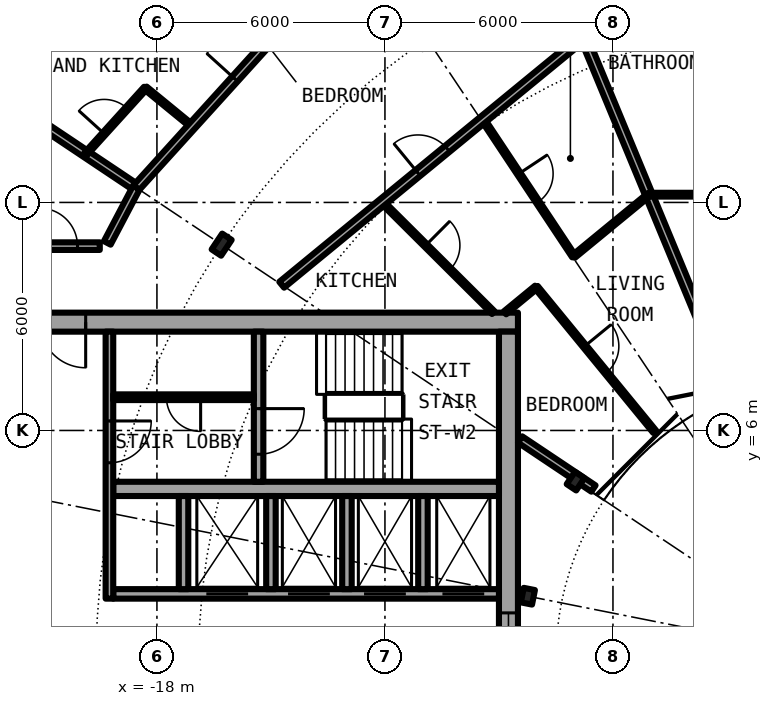
"""IFC4 building model, lengths in metres.
Left out: names, types, materials, properties, quantities, classifications, styles, units other than length and angle.
Written with IfcOpenShell. Run it as: python <this file> out.ifc"""

import sys

from ifc_helpers import new_model, si_unit, direction, frame, frame_2d, origin, origin_2d, place, context, subcontext, project, spatial, rectangle, i_section, extrude, element, fill, save


model = new_model("IFC4")
c1 = context("Model", 3, precision=1e-05, world=origin(), true_north=direction((0.0, 1.0)))
c2 = subcontext(c1, "Body", "Model", "MODEL_VIEW")
j1 = project(units=[si_unit("LENGTHUNIT", "METRE"), si_unit("PLANEANGLEUNIT", "RADIAN")], contexts=[c1])
p1 = place(None, origin())
s1 = spatial("IfcSite", under=j1, at=p1, CompositionType="ELEMENT")
p2 = place(p1, origin())
s2 = spatial("IfcBuilding", under=s1, at=p2, CompositionType="ELEMENT")
p3 = place(p2, frame((0.0, 0.0, 173.8)))
s3 = spatial("IfcBuildingStorey", under=s2, at=p3, CompositionType="ELEMENT", Elevation=173.8)
p4 = place(p3, frame((-16.297, 10.889, 0.0), z_axis=(0.0, 0.0, 1.0), x_axis=(-0.831469612303, 0.55557023302, 0.0)))
e1 = element("IfcColumn", 1, at=p4, inside=s3, PredefinedType="COLUMN", context=c2, shape_type="SweptSolid", body=[
    extrude(i_section(OverallWidth=0.3, OverallDepth=0.5, WebThickness=0.014, FlangeThickness=0.028, FilletRadius=0.027, at=origin_2d()), origin(), (0.0, 0.0, 1.0), 3.05),
])
for number, where, z_axis, x_axis in (
    (2, (-6.984, 4.667, 0.0), (0.0, 0.0, 1.0), (-0.831, 0.556, 0.0)),
    (3, (-8.239, 1.639, 0.0), (0.0, 0.0, 1.0), (-0.981, 0.195, 0.0)),
):
    element("IfcColumn", number, at=place(p3, frame(where, z_axis=z_axis, x_axis=x_axis)), inside=s3, PredefinedType="COLUMN", context=c2, shape_type="SweptSolid", body=[
        extrude(i_section(OverallWidth=0.3, OverallDepth=0.39, WebThickness=0.011, FlangeThickness=0.019, FilletRadius=0.027, at=origin_2d()), origin(), (0.0, 0.0, 1.0), 3.05),
    ])
p5 = place(p3, frame((-19.304, 19.304, 0.0), z_axis=(0.0, 0.0, 1.0), x_axis=(-0.634382322723, -0.773019449054, 0.0)))
e4 = element("IfcWall", 4, at=p5, inside=s3, PredefinedType="SOLIDWALL", context=c2, shape_type="SweptSolid", body=[
    extrude(rectangle(XDim=5.352, YDim=0.25, at=frame_2d((2.676, 0.0))), origin(), (0.0, 0.0, 1.0), 2.7),
])
p6 = place(p5, frame((0.841, 0.0, 0.0)))
e5 = element("IfcOpeningElement", 5, at=p6, cuts=e4, PredefinedType="OPENING", context=c2, shape_type="SweptSolid", body=[
    extrude(rectangle(XDim=1.0, YDim=2.2, at=frame_2d((0.5, 1.1))), frame((0.0, 0.135, 0.0), z_axis=(0.0, -1.0, 0.0), x_axis=(1.0, 0.0, 0.0)), (0.0, 0.0, 1.0), 0.27),
])
p7 = place(p5, frame((3.111, 0.0, 0.3)))
e6 = element("IfcOpeningElement", 6, at=p7, cuts=e4, PredefinedType="OPENING", context=c2, shape_type="SweptSolid", body=[
    extrude(rectangle(XDim=1.8, YDim=2.1, at=frame_2d((0.9, 1.05))), frame((0.0, 0.135, 0.0), z_axis=(0.0, -1.0, 0.0), x_axis=(1.0, 0.0, 0.0)), (0.0, 0.0, 1.0), 0.27),
])
p8 = place(p3, frame((-8.5, 8.85, 0.0), z_axis=(0.0, 0.0, 1.0), x_axis=(-1.0, 0.0, 0.0)))
e7 = element("IfcWall", 7, at=p8, inside=s3, PredefinedType="SHEAR", context=c2, shape_type="SweptSolid", body=[
    extrude(rectangle(XDim=13.6, YDim=0.5, at=frame_2d((6.8, 0.0))), origin(), (0.0, 0.0, 1.0), 3.05),
])
p9 = place(p8, frame((11.375, 0.0, 0.0)))
e8 = element("IfcOpeningElement", 8, at=p9, cuts=e7, PredefinedType="OPENING", context=c2, shape_type="SweptSolid", body=[
    extrude(rectangle(XDim=1.2, YDim=2.3, at=frame_2d((0.6, 1.15))), frame((0.0, 0.26, 0.0), z_axis=(0.0, -1.0, 0.0), x_axis=(1.0, 0.0, 0.0)), (0.0, 0.0, 1.0), 0.52),
])
p10 = place(p3, frame((-8.75, 8.6, 0.0), z_axis=(0.0, 0.0, 1.0), x_axis=(0.0, -1.0, 0.0)))
e9 = element("IfcWall", 9, at=p10, inside=s3, PredefinedType="SHEAR", context=c2, shape_type="SweptSolid", body=[
    extrude(rectangle(XDim=17.2, YDim=0.5, at=frame_2d((8.6, 0.0))), origin(), (0.0, 0.0, 1.0), 3.05),
])
p11 = place(p10, frame((7.4, 0.0, 0.1)))
e10 = element("IfcOpeningElement", 10, at=p11, cuts=e9, PredefinedType="OPENING", context=c2, shape_type="SweptSolid", body=[
    extrude(rectangle(XDim=2.4, YDim=2.2, at=frame_2d((1.2, 1.1))), frame((0.0, 0.26, 0.0), z_axis=(0.0, -1.0, 0.0), x_axis=(1.0, 0.0, 0.0)), (0.0, 0.0, 1.0), 0.52),
])
p12 = place(p3, frame((-9.0, 1.7, 0.0), z_axis=(0.0, 0.0, 1.0), x_axis=(-1.0, 0.0, 0.0)))
e11 = element("IfcWall", 11, at=p12, inside=s3, PredefinedType="SHEAR", context=c2, shape_type="SweptSolid", body=[
    extrude(rectangle(XDim=10.15, YDim=0.25, at=frame_2d((5.075, 0.0))), origin(), (0.0, 0.0, 1.0), 3.05),
])
p13 = place(p12, frame((0.387, 0.0, 0.0)))
e12 = element("IfcOpeningElement", 12, at=p13, cuts=e11, PredefinedType="OPENING", context=c2, shape_type="SweptSolid", body=[
    extrude(rectangle(XDim=1.1, YDim=2.3, at=frame_2d((0.55, 1.15))), frame((0.0, 0.135, 0.0), z_axis=(0.0, -1.0, 0.0), x_axis=(1.0, 0.0, 0.0)), (0.0, 0.0, 1.0), 0.27),
])
p14 = place(p12, frame((2.45, 0.0, 0.0)))
e13 = element("IfcOpeningElement", 13, at=p14, cuts=e11, PredefinedType="OPENING", context=c2, shape_type="SweptSolid", body=[
    extrude(rectangle(XDim=1.1, YDim=2.3, at=frame_2d((0.55, 1.15))), frame((0.0, 0.135, 0.0), z_axis=(0.0, -1.0, 0.0), x_axis=(1.0, 0.0, 0.0)), (0.0, 0.0, 1.0), 0.27),
])
p15 = place(p12, frame((4.45, 0.0, 0.0)))
e14 = element("IfcOpeningElement", 14, at=p15, cuts=e11, PredefinedType="OPENING", context=c2, shape_type="SweptSolid", body=[
    extrude(rectangle(XDim=1.1, YDim=2.3, at=frame_2d((0.55, 1.15))), frame((0.0, 0.135, 0.0), z_axis=(0.0, -1.0, 0.0), x_axis=(1.0, 0.0, 0.0)), (0.0, 0.0, 1.0), 0.27),
])
p16 = place(p12, frame((6.6, 0.0, 0.0)))
e15 = element("IfcOpeningElement", 15, at=p16, cuts=e11, PredefinedType="OPENING", context=c2, shape_type="SweptSolid", body=[
    extrude(rectangle(XDim=1.1, YDim=2.3, at=frame_2d((0.55, 1.15))), frame((0.0, 0.135, 0.0), z_axis=(0.0, -1.0, 0.0), x_axis=(1.0, 0.0, 0.0)), (0.0, 0.0, 1.0), 0.27),
])
p17 = place(p3, frame((-9.0, 4.462, 0.0), z_axis=(0.0, 0.0, 1.0), x_axis=(-1.0, 0.0, 0.0)))
e16 = element("IfcWall", 16, at=p17, inside=s3, PredefinedType="SHEAR", context=c2, shape_type="SweptSolid", body=[
    extrude(rectangle(XDim=10.15, YDim=0.375, at=frame_2d((5.075, 0.0))), origin(), (0.0, 0.0, 1.0), 3.05),
])
p18 = place(p3, frame((-15.325, 8.6, 0.0), z_axis=(0.0, 0.0, 1.0), x_axis=(0.0, -1.0, 0.0)))
e17 = element("IfcWall", 17, at=p18, inside=s3, PredefinedType="SHEAR", context=c2, shape_type="SweptSolid", body=[
    extrude(rectangle(XDim=3.95, YDim=0.25, at=frame_2d((1.975, 0.0))), origin(), (0.0, 0.0, 1.0), 3.05),
])
p19 = place(p18, frame((2.025, 0.0, 0.0)))
e18 = element("IfcOpeningElement", 18, at=p19, cuts=e17, PredefinedType="OPENING", context=c2, shape_type="SweptSolid", body=[
    extrude(rectangle(XDim=1.2, YDim=2.3, at=frame_2d((0.6, 1.15))), frame((0.0, 0.135, 0.0), z_axis=(0.0, -1.0, 0.0), x_axis=(1.0, 0.0, 0.0)), (0.0, 0.0, 1.0), 0.27),
])
for number, where, z_axis, x_axis in (
    (19, (-15.0, 1.825, 0.0), (0.0, 0.0, 1.0), (0.0, 1.0, 0.0)),
    (20, (-17.3, 1.825, 0.0), (0.0, 0.0, 1.0), (0.0, 1.0, 0.0)),
):
    element("IfcWall", number, at=place(p3, frame(where, z_axis=z_axis, x_axis=x_axis)), inside=s3, PredefinedType="SOLIDWALL", context=c2, shape_type="SweptSolid", body=[
        extrude(rectangle(XDim=2.45, YDim=0.25, at=frame_2d((1.225, 0.0))), origin(), (0.0, 0.0, 1.0), 2.7),
    ])
p20 = place(p3, frame((-19.25, 8.6, 0.0), z_axis=(0.0, 0.0, 1.0), x_axis=(0.0, -1.0, 0.0)))
e21 = element("IfcWall", 21, at=p20, inside=s3, PredefinedType="SOLIDWALL", context=c2, shape_type="SweptSolid", body=[
    extrude(rectangle(XDim=7.025, YDim=0.2, at=frame_2d((3.513, 0.0))), origin(), (0.0, 0.0, 1.0), 2.7),
])
p21 = place(p20, frame((2.35, 0.0, 0.0)))
e22 = element("IfcOpeningElement", 22, at=p21, cuts=e21, PredefinedType="OPENING", context=c2, shape_type="SweptSolid", body=[
    extrude(rectangle(XDim=1.1, YDim=2.3, at=frame_2d((0.55, 1.15))), frame((0.0, 0.11, 0.0), z_axis=(0.0, -1.0, 0.0), x_axis=(1.0, 0.0, 0.0)), (0.0, 0.0, 1.0), 0.22),
])
for number, where, z_axis, x_axis in (
    (23, (-11.0, 1.825, 0.0), (0.0, 0.0, 1.0), (0.0, 1.0, 0.0)),
    (24, (-13.0, 1.825, 0.0), (0.0, 0.0, 1.0), (0.0, 1.0, 0.0)),
):
    element("IfcWall", number, at=place(p3, frame(where, z_axis=z_axis, x_axis=x_axis)), inside=s3, PredefinedType="SOLIDWALL", context=c2, shape_type="SweptSolid", body=[
        extrude(rectangle(XDim=2.45, YDim=0.25, at=frame_2d((1.225, 0.0))), origin(), (0.0, 0.0, 1.0), 2.7),
    ])
p22 = place(p3, frame((-15.45, 6.875, 0.0), z_axis=(0.0, 0.0, 1.0), x_axis=(-1.0, 0.0, 0.0)))
e25 = element("IfcWall", 25, at=p22, inside=s3, PredefinedType="PARTITIONING", context=c2, shape_type="SweptSolid", body=[
    extrude(rectangle(XDim=3.7, YDim=0.15, at=frame_2d((1.85, 0.0))), origin(), (0.0, 0.0, 1.0), 2.7),
])
p23 = place(p22, frame((1.4, 0.0, 0.0)))
e26 = element("IfcOpeningElement", 26, at=p23, cuts=e25, PredefinedType="OPENING", context=c2, shape_type="SweptSolid", body=[
    extrude(rectangle(XDim=0.9, YDim=2.3, at=frame_2d((0.45, 1.15))), frame((0.0, 0.085, 0.0), z_axis=(0.0, -1.0, 0.0), x_axis=(1.0, 0.0, 0.0)), (0.0, 0.0, 1.0), 0.17),
])
p24 = place(p3, frame((-8.019, 9.771, 0.0), z_axis=(0.0, 0.0, 1.0), x_axis=(0.633851064378, -0.773455123577, 0.0)))
e27 = element("IfcWall", 27, at=p24, inside=s3, PredefinedType="PARTITIONING", context=c2, shape_type="SweptSolid", body=[
    extrude(rectangle(XDim=4.919, YDim=0.1, at=frame_2d((2.46, 0.0))), origin(), (0.0, 0.0, 1.0), 2.7),
])
p25 = place(p24, frame((2.01, 0.0, 0.0)))
e28 = element("IfcOpeningElement", 28, at=p25, cuts=e27, PredefinedType="OPENING", context=c2, shape_type="SweptSolid", body=[
    extrude(rectangle(XDim=0.9, YDim=2.3, at=frame_2d((0.45, 1.15))), frame((0.0, 0.06, 0.0), z_axis=(0.0, -1.0, 0.0), x_axis=(1.0, 0.0, 0.0)), (0.0, 0.0, 1.0), 0.12),
])
p26 = place(p3, frame((-22.595, 15.098, 0.0), z_axis=(0.0, 0.0, 1.0), x_axis=(0.831387096605, -0.55569370664, 0.0)))
e29 = element("IfcWall", 29, at=p26, inside=s3, PredefinedType="PARTITIONING", context=c2, shape_type="SweptSolid", body=[
    extrude(rectangle(XDim=4.875, YDim=0.2, at=frame_2d((2.438, 0.0))), origin(), (0.0, 0.0, 1.0), 2.7),
])
p27 = place(p3, frame((-12.069, 12.007, 0.0), z_axis=(0.0, 0.0, 1.0), x_axis=(0.708822693149, -0.705386695138, 0.0)))
e30 = element("IfcWall", 30, at=p27, inside=s3, PredefinedType="PARTITIONING", context=c2, shape_type="SweptSolid", body=[
    extrude(rectangle(XDim=4.121, YDim=0.1, at=frame_2d((2.061, 0.0))), origin(), (0.0, 0.0, 1.0), 2.7),
])
p28 = place(p27, frame((1.611, 0.0, 0.0)))
e31 = element("IfcOpeningElement", 31, at=p28, cuts=e30, PredefinedType="OPENING", context=c2, shape_type="SweptSolid", body=[
    extrude(rectangle(XDim=0.9, YDim=2.3, at=frame_2d((0.45, 1.15))), frame((0.0, 0.06, 0.0), z_axis=(0.0, -1.0, 0.0), x_axis=(1.0, 0.0, 0.0)), (0.0, 0.0, 1.0), 0.12),
])
p29 = place(p3, frame((-9.421, 14.18, 0.0), z_axis=(0.0, 0.0, 1.0), x_axis=(0.553303732327, -0.832979579457, 0.0)))
e32 = element("IfcWall", 32, at=p29, inside=s3, PredefinedType="PARTITIONING", context=c2, shape_type="SweptSolid", body=[
    extrude(rectangle(XDim=4.319, YDim=0.1, at=frame_2d((2.16, 0.0))), origin(), (0.0, 0.0, 1.0), 2.7),
])
p30 = place(p29, frame((1.71, 0.0, 0.0)))
e33 = element("IfcOpeningElement", 33, at=p30, cuts=e32, PredefinedType="OPENING", context=c2, shape_type="SweptSolid", body=[
    extrude(rectangle(XDim=0.9, YDim=2.3, at=frame_2d((0.45, 1.15))), frame((0.0, 0.06, 0.0), z_axis=(0.0, -1.0, 0.0), x_axis=(1.0, 0.0, 0.0)), (0.0, 0.0, 1.0), 0.12),
])
p31 = place(p3, frame((-6.773, 16.353, 0.0), z_axis=(0.0, 0.0, 1.0), x_axis=(0.382632652025, -0.923900564782, 0.0)))
e34 = element("IfcWall", 34, at=p31, inside=s3, PredefinedType="PARTITIONING", context=c2, shape_type="SweptSolid", body=[
    extrude(rectangle(XDim=9.98, YDim=0.2, at=frame_2d((4.99, 0.0))), origin(), (0.0, 0.0, 1.0), 2.7),
])
p32 = place(p3, frame((-18.302, 15.01, 0.0), z_axis=(0.0, 0.0, 1.0), x_axis=(0.773476341377, -0.633825172528, 0.0)))
e35 = element("IfcWall", 35, at=p32, inside=s3, PredefinedType="PARTITIONING", context=c2, shape_type="SweptSolid", body=[
    extrude(rectangle(XDim=1.584, YDim=0.1, at=frame_2d((0.792, 0.0))), origin(), (0.0, 0.0, 1.0), 2.7),
])
p33 = place(p3, frame((-6.513, 4.472, 0.0), z_axis=(0.0, 0.0, 1.0), x_axis=(-0.83133816625, 0.555766905579, 0.0)))
e36 = element("IfcWall", 36, at=p33, inside=s3, PredefinedType="PARTITIONING", context=c2, shape_type="SweptSolid", body=[
    extrude(rectangle(XDim=2.323, YDim=0.2, at=frame_2d((1.162, 0.0))), origin(), (0.0, 0.0, 1.0), 2.7),
])
p34 = place(p3, frame((-21.675, 10.85, 0.0), z_axis=(0.0, 0.0, 1.0), x_axis=(1.0, 0.0, 0.0)))
e37 = element("IfcWall", 37, at=p34, inside=s3, PredefinedType="PARTITIONING", context=c2, shape_type="SweptSolid", body=[
    extrude(rectangle(XDim=2.171, YDim=0.2, at=frame_2d((1.085, 0.0))), origin(), (0.0, 0.0, 1.0), 2.7),
])
p35 = place(p34, frame((0.585, 0.0, 0.0)))
e38 = element("IfcOpeningElement", 38, at=p35, cuts=e37, PredefinedType="OPENING", context=c2, shape_type="SweptSolid", body=[
    extrude(rectangle(XDim=1.0, YDim=2.3, at=frame_2d((0.5, 1.15))), frame((0.0, 0.11, 0.0), z_axis=(0.0, -1.0, 0.0), x_axis=(1.0, 0.0, 0.0)), (0.0, 0.0, 1.0), 0.22),
])
p36 = place(p3, frame((-5.055, 12.204, 0.0), z_axis=(0.0, 0.0, 1.0), x_axis=(1.0, 0.0, 0.0)))
e39 = element("IfcWall", 39, at=p36, inside=s3, PredefinedType="PARTITIONING", context=c2, shape_type="SweptSolid", body=[
    extrude(rectangle(XDim=2.528, YDim=0.1, at=frame_2d((1.264, 0.0))), origin(), (0.0, 0.0, 1.0), 2.7),
])
p37 = place(p3, frame((-8.842, 9.095, 0.0), z_axis=(0.0, 0.0, 1.0), x_axis=(0.772730269942, 0.634734534995, 0.0)))
e40 = element("IfcWall", 40, at=p37, inside=s3, PredefinedType="PARTITIONING", context=c2, shape_type="SweptSolid", body=[
    extrude(rectangle(XDim=1.065, YDim=0.1, at=frame_2d((0.532, 0.0))), origin(), (0.0, 0.0, 1.0), 2.7),
])
p38 = place(p3, frame((-7.034, 10.58, 0.0), z_axis=(0.0, 0.0, 1.0), x_axis=(0.772764723682, 0.634692588449, 0.0)))
e41 = element("IfcWall", 41, at=p38, inside=s3, PredefinedType="PARTITIONING", context=c2, shape_type="SweptSolid", body=[
    extrude(rectangle(XDim=2.557, YDim=0.1, at=frame_2d((1.278, 0.0))), origin(), (0.0, 0.0, 1.0), 2.7),
])
p39 = place(p3, frame((-14.717, 9.834, 0.0), z_axis=(0.0, 0.0, 1.0), x_axis=(0.773034536097, 0.634363938131, 0.0)))
e42 = element("IfcWall", 42, at=p39, inside=s3, PredefinedType="PARTITIONING", context=c2, shape_type="SweptSolid", body=[
    extrude(rectangle(XDim=10.277, YDim=0.2, at=frame_2d((5.138, 0.0))), origin(), (0.0, 0.0, 1.0), 2.7),
])
p40 = place(p39, frame((4.638, 0.0, 0.0)))
e43 = element("IfcOpeningElement", 43, at=p40, cuts=e42, PredefinedType="OPENING", context=c2, shape_type="SweptSolid", body=[
    extrude(rectangle(XDim=1.0, YDim=2.3, at=frame_2d((0.5, 1.15))), frame((0.0, 0.11, 0.0), z_axis=(0.0, -1.0, 0.0), x_axis=(1.0, 0.0, 0.0)), (0.0, 0.0, 1.0), 0.22),
])
p41 = place(p3, frame((-18.542, 12.389, 0.0), z_axis=(0.0, 0.0, 1.0), x_axis=(0.671561669125, 0.740948665268, 0.0)))
e44 = element("IfcWall", 44, at=p41, inside=s3, PredefinedType="PARTITIONING", context=c2, shape_type="SweptSolid", body=[
    extrude(rectangle(XDim=6.544, YDim=0.2, at=frame_2d((3.272, 0.0))), origin(), (0.0, 0.0, 1.0), 2.7),
])
p42 = place(p41, frame((3.862, 0.0, 0.0)))
e45 = element("IfcOpeningElement", 45, at=p42, cuts=e44, PredefinedType="OPENING", context=c2, shape_type="SweptSolid", body=[
    extrude(rectangle(XDim=1.0, YDim=2.3, at=frame_2d((0.5, 1.15))), frame((0.0, 0.11, 0.0), z_axis=(0.0, -1.0, 0.0), x_axis=(1.0, 0.0, 0.0)), (0.0, 0.0, 1.0), 0.22),
])
p43 = place(p3, frame((-19.307, 10.935, 0.0), z_axis=(0.0, 0.0, 1.0), x_axis=(0.465605550524, 0.884992356646, 0.0)))
e46 = element("IfcWall", 46, at=p43, inside=s3, PredefinedType="PARTITIONING", context=c2, shape_type="SweptSolid", body=[
    extrude(rectangle(XDim=1.643, YDim=0.2, at=frame_2d((0.821, 0.0))), origin(), (0.0, 0.0, 1.0), 2.7),
])
p44 = place(p3, frame((-19.872, 13.278, 0.0), z_axis=(0.0, 0.0, 1.0), x_axis=(0.671637685376, 0.740879760544, 0.0)))
e47 = element("IfcWall", 47, at=p44, inside=s3, PredefinedType="PARTITIONING", context=c2, shape_type="SweptSolid", body=[
    extrude(rectangle(XDim=2.338, YDim=0.1, at=frame_2d((1.169, 0.0))), origin(), (0.0, 0.0, 1.0), 2.7),
])
p45 = place(p44, frame((0.719, 0.0, 0.0)))
e48 = element("IfcOpeningElement", 48, at=p45, cuts=e47, PredefinedType="OPENING", context=c2, shape_type="SweptSolid", body=[
    extrude(rectangle(XDim=0.9, YDim=2.3, at=frame_2d((0.45, 1.15))), frame((0.0, 0.06, 0.0), z_axis=(0.0, -1.0, 0.0), x_axis=(1.0, 0.0, 0.0)), (0.0, 0.0, 1.0), 0.12),
])
p46 = place(p13, origin())
e49 = element("IfcDoor", 49, at=p46, inside=s3, OperationType="DOUBLE_DOOR_SLIDING", PredefinedType="DOOR", context=c2, shape_type="SweptSolid", body=[
    extrude(rectangle(XDim=1.1, YDim=2.3, at=frame_2d((0.55, 1.15))), frame((0.0, 0.025, 0.0), z_axis=(0.0, -1.0, 0.0), x_axis=(1.0, 0.0, 0.0)), (0.0, 0.0, 1.0), 0.05),
])
fill(e12, e49)
p47 = place(p14, origin())
e50 = element("IfcDoor", 50, at=p47, inside=s3, OperationType="DOUBLE_DOOR_SLIDING", PredefinedType="DOOR", context=c2, shape_type="SweptSolid", body=[
    extrude(rectangle(XDim=1.1, YDim=2.3, at=frame_2d((0.55, 1.15))), frame((0.0, 0.025, 0.0), z_axis=(0.0, -1.0, 0.0), x_axis=(1.0, 0.0, 0.0)), (0.0, 0.0, 1.0), 0.05),
])
fill(e13, e50)
p48 = place(p15, origin())
e51 = element("IfcDoor", 51, at=p48, inside=s3, OperationType="DOUBLE_DOOR_SLIDING", PredefinedType="DOOR", context=c2, shape_type="SweptSolid", body=[
    extrude(rectangle(XDim=1.1, YDim=2.3, at=frame_2d((0.55, 1.15))), frame((0.0, 0.025, 0.0), z_axis=(0.0, -1.0, 0.0), x_axis=(1.0, 0.0, 0.0)), (0.0, 0.0, 1.0), 0.05),
])
fill(e14, e51)
p49 = place(p16, origin())
e52 = element("IfcDoor", 52, at=p49, inside=s3, OperationType="DOUBLE_DOOR_SLIDING", PredefinedType="DOOR", context=c2, shape_type="SweptSolid", body=[
    extrude(rectangle(XDim=1.1, YDim=2.3, at=frame_2d((0.55, 1.15))), frame((0.0, 0.025, 0.0), z_axis=(0.0, -1.0, 0.0), x_axis=(1.0, 0.0, 0.0)), (0.0, 0.0, 1.0), 0.05),
])
fill(e15, e52)
p50 = place(p23, origin())
e53 = element("IfcDoor", 53, at=p50, inside=s3, OperationType="SINGLE_SWING_LEFT", PredefinedType="DOOR", context=c2, shape_type="SweptSolid", body=[
    extrude(rectangle(XDim=0.9, YDim=2.3, at=frame_2d((0.45, 1.15))), frame((0.0, 0.025, 0.0), z_axis=(0.0, -1.0, 0.0), x_axis=(1.0, 0.0, 0.0)), (0.0, 0.0, 1.0), 0.05),
])
fill(e26, e53)
p51 = place(p19, origin())
e54 = element("IfcDoor", 54, at=p51, inside=s3, OperationType="SINGLE_SWING_LEFT", PredefinedType="DOOR", context=c2, shape_type="SweptSolid", body=[
    extrude(rectangle(XDim=1.2, YDim=2.3, at=frame_2d((0.6, 1.15))), frame((0.0, 0.025, 0.0), z_axis=(0.0, -1.0, 0.0), x_axis=(1.0, 0.0, 0.0)), (0.0, 0.0, 1.0), 0.05),
])
fill(e18, e54)
p52 = place(p21, origin())
e55 = element("IfcDoor", 55, at=p52, inside=s3, OperationType="SINGLE_SWING_RIGHT", PredefinedType="DOOR", context=c2, shape_type="SweptSolid", body=[
    extrude(rectangle(XDim=1.1, YDim=2.3, at=frame_2d((0.55, 1.15))), frame((0.0, 0.025, 0.0), z_axis=(0.0, -1.0, 0.0), x_axis=(1.0, 0.0, 0.0)), (0.0, 0.0, 1.0), 0.05),
])
fill(e22, e55)
p53 = place(p9, origin())
e56 = element("IfcDoor", 56, at=p53, inside=s3, OperationType="SINGLE_SWING_LEFT", PredefinedType="DOOR", context=c2, shape_type="SweptSolid", body=[
    extrude(rectangle(XDim=1.2, YDim=2.3, at=frame_2d((0.6, 1.15))), frame((0.0, 0.025, 0.0), z_axis=(0.0, -1.0, 0.0), x_axis=(1.0, 0.0, 0.0)), (0.0, 0.0, 1.0), 0.05),
])
fill(e8, e56)
p54 = place(p11, origin())
e57 = element("IfcWindow", 57, at=p54, inside=s3, PartitioningType="SINGLE_PANEL", PredefinedType="WINDOW", context=c2, shape_type="SweptSolid", body=[
    extrude(rectangle(XDim=2.4, YDim=2.2, at=frame_2d((1.2, 1.1))), frame((0.0, 0.03, 0.0), z_axis=(0.0, -1.0, 0.0), x_axis=(1.0, 0.0, 0.0)), (0.0, 0.0, 1.0), 0.06),
])
fill(e10, e57)
p55 = place(p42, origin())
e58 = element("IfcDoor", 58, at=p55, inside=s3, OperationType="SINGLE_SWING_RIGHT", PredefinedType="DOOR", context=c2, shape_type="SweptSolid", body=[
    extrude(rectangle(XDim=1.0, YDim=2.3, at=frame_2d((0.5, 1.15))), frame((0.0, 0.025, 0.0), z_axis=(0.0, -1.0, 0.0), x_axis=(1.0, 0.0, 0.0)), (0.0, 0.0, 1.0), 0.05),
])
fill(e45, e58)
p56 = place(p45, origin())
e59 = element("IfcDoor", 59, at=p56, inside=s3, OperationType="SINGLE_SWING_LEFT", PredefinedType="DOOR", context=c2, shape_type="SweptSolid", body=[
    extrude(rectangle(XDim=0.9, YDim=2.3, at=frame_2d((0.45, 1.15))), frame((0.0, 0.025, 0.0), z_axis=(0.0, -1.0, 0.0), x_axis=(1.0, 0.0, 0.0)), (0.0, 0.0, 1.0), 0.05),
])
fill(e48, e59)
p57 = place(p40, origin())
e60 = element("IfcDoor", 60, at=p57, inside=s3, OperationType="SINGLE_SWING_LEFT", PredefinedType="DOOR", context=c2, shape_type="SweptSolid", body=[
    extrude(rectangle(XDim=1.0, YDim=2.3, at=frame_2d((0.5, 1.15))), frame((0.0, 0.025, 0.0), z_axis=(0.0, -1.0, 0.0), x_axis=(1.0, 0.0, 0.0)), (0.0, 0.0, 1.0), 0.05),
])
fill(e43, e60)
p58 = place(p30, origin())
e61 = element("IfcDoor", 61, at=p58, inside=s3, OperationType="SINGLE_SWING_RIGHT", PredefinedType="DOOR", context=c2, shape_type="SweptSolid", body=[
    extrude(rectangle(XDim=0.9, YDim=2.3, at=frame_2d((0.45, 1.15))), frame((0.0, 0.025, 0.0), z_axis=(0.0, -1.0, 0.0), x_axis=(1.0, 0.0, 0.0)), (0.0, 0.0, 1.0), 0.05),
])
fill(e33, e61)
p59 = place(p28, origin())
e62 = element("IfcDoor", 62, at=p59, inside=s3, OperationType="SINGLE_SWING_RIGHT", PredefinedType="DOOR", context=c2, shape_type="SweptSolid", body=[
    extrude(rectangle(XDim=0.9, YDim=2.3, at=frame_2d((0.45, 1.15))), frame((0.0, 0.025, 0.0), z_axis=(0.0, -1.0, 0.0), x_axis=(1.0, 0.0, 0.0)), (0.0, 0.0, 1.0), 0.05),
])
fill(e31, e62)
p60 = place(p25, origin())
e63 = element("IfcDoor", 63, at=p60, inside=s3, OperationType="SINGLE_SWING_RIGHT", PredefinedType="DOOR", context=c2, shape_type="SweptSolid", body=[
    extrude(rectangle(XDim=0.9, YDim=2.3, at=frame_2d((0.45, 1.15))), frame((0.0, 0.025, 0.0), z_axis=(0.0, -1.0, 0.0), x_axis=(1.0, 0.0, 0.0)), (0.0, 0.0, 1.0), 0.05),
])
fill(e28, e63)
p61 = place(p35, origin())
e64 = element("IfcDoor", 64, at=p61, inside=s3, OperationType="SINGLE_SWING_LEFT", PredefinedType="DOOR", context=c2, shape_type="SweptSolid", body=[
    extrude(rectangle(XDim=1.0, YDim=2.3, at=frame_2d((0.5, 1.15))), frame((0.0, 0.025, 0.0), z_axis=(0.0, -1.0, 0.0), x_axis=(1.0, 0.0, 0.0)), (0.0, 0.0, 1.0), 0.05),
])
fill(e38, e64)
save(model, sys.argv[1])
